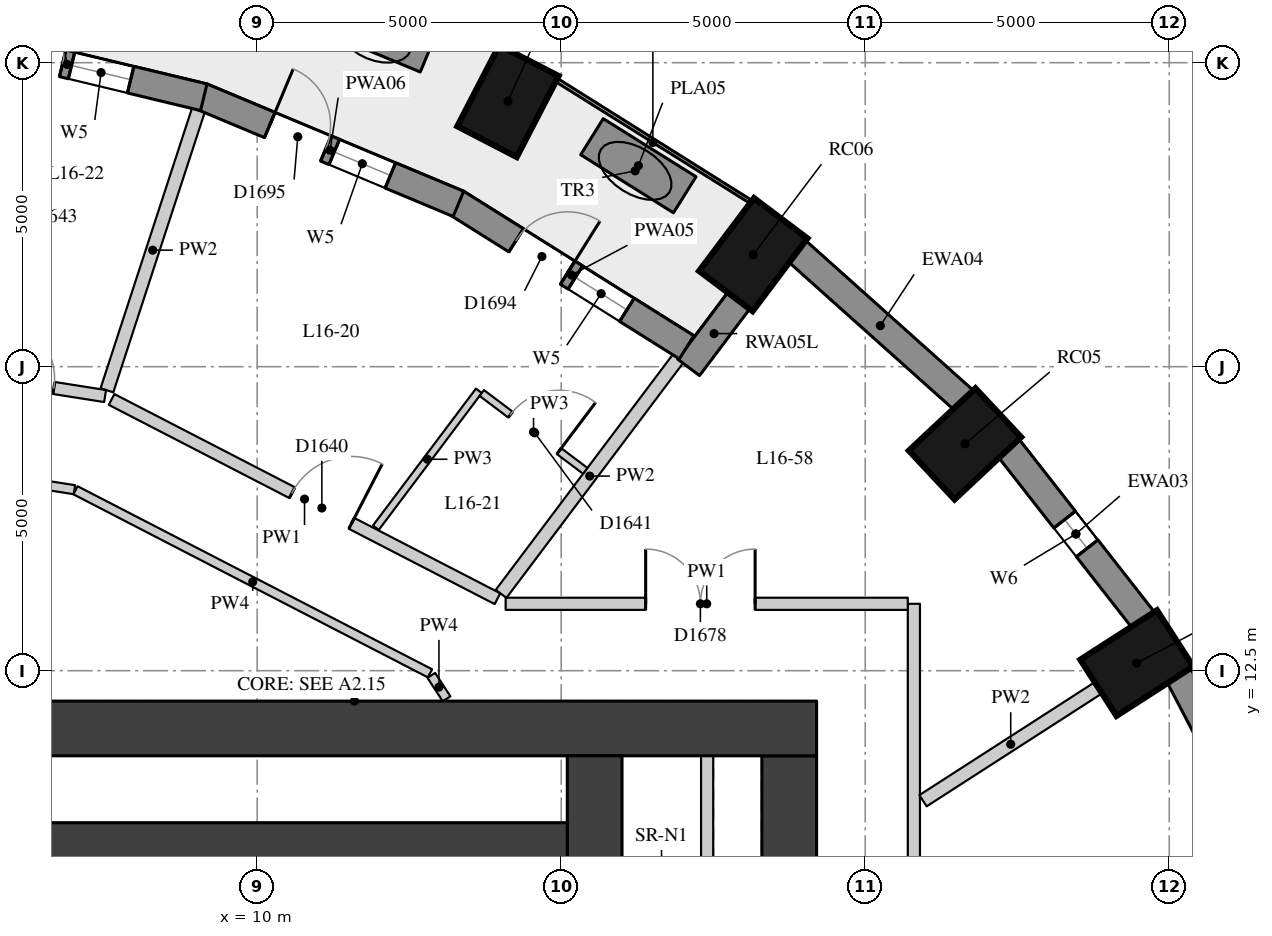
"""IFC4 building model, lengths in metres.
Left out: names, types, materials, properties, quantities, classifications, styles, units other than length and angle.
Written with IfcOpenShell. Run it as: python <this file> out.ifc"""

import sys

from ifc_helpers import new_model, si_unit, direction, frame, frame_2d, origin, origin_2d, place, context, subcontext, project, spatial, rectangle, extrude, element, fill, save


model = new_model("IFC4")
c1 = context("Model", 3, precision=1e-05, world=origin(), true_north=direction((0.0, 1.0)))
c2 = subcontext(c1, "Body", "Model", "MODEL_VIEW")
j1 = project(units=[si_unit("LENGTHUNIT", "METRE"), si_unit("PLANEANGLEUNIT", "RADIAN")], contexts=[c1])
p1 = place(None, origin())
s1 = spatial("IfcSite", under=j1, at=p1, CompositionType="ELEMENT")
p2 = place(p1, origin())
s2 = spatial("IfcBuilding", under=s1, at=p2, CompositionType="ELEMENT")
p3 = place(p2, frame((0.0, 0.0, 61.3)))
s3 = spatial("IfcBuildingStorey", under=s2, at=p3, CompositionType="ELEMENT", Elevation=61.3)
for number, where, z_axis, x_axis in (
    (1, (24.465, 12.625, 0.0), (0.0, 0.0, 1.0), (0.841, 0.541, 0.0)),
    (2, (21.641, 16.23, 0.0), (0.0, 0.0, 1.0), (0.73, 0.683, 0.0)),
    (3, (18.159, 19.343, 0.0), (0.0, 0.0, 1.0), (0.601, 0.799, 0.0)),
    (4, (14.125, 21.867, 0.0), (0.0, 0.0, 1.0), (0.46, 0.888, 0.0)),
):
    element("IfcColumn", number, at=place(p3, frame(where, z_axis=z_axis, x_axis=x_axis)), inside=s3, PredefinedType="COLUMN", context=c2, shape_type="SweptSolid", body=[
        extrude(rectangle(XDim=1.5, YDim=1.1, at=origin_2d()), origin(), (0.0, 0.0, 1.0), 3.3),
    ])
p4 = place(p3, frame((26.786, 9.305, 0.0), z_axis=(0.0, 0.0, 1.0), x_axis=(-0.462492775226, 0.886623050041, 0.0)))
e5 = element("IfcWall", 5, at=p4, inside=s3, PredefinedType="SOLIDWALL", context=c2, shape_type="SweptSolid", body=[
    extrude(rectangle(XDim=3.532, YDim=0.45, at=frame_2d((1.766, 0.0))), origin(), (0.0, 0.0, 1.0), 3.02),
])
p5 = place(p3, frame((24.578, 13.328, 0.0), z_axis=(0.0, 0.0, 1.0), x_axis=(-0.616661975264, 0.787228053529, 0.0)))
e6 = element("IfcWall", 6, at=p5, inside=s3, PredefinedType="SOLIDWALL", context=c2, shape_type="SweptSolid", body=[
    extrude(rectangle(XDim=3.61, YDim=0.45, at=frame_2d((1.805, 0.0))), origin(), (0.0, 0.0, 1.0), 3.02),
])
p6 = place(p5, frame((1.505, 0.0, 0.4)))
e7 = element("IfcOpeningElement", 7, at=p6, cuts=e6, PredefinedType="OPENING", context=c2, shape_type="SweptSolid", body=[
    extrude(rectangle(XDim=0.6, YDim=1.75, at=frame_2d((0.3, 0.875))), frame((0.0, 0.235, 0.0), z_axis=(0.0, -1.0, 0.0), x_axis=(1.0, 0.0, 0.0)), (0.0, 0.0, 1.0), 0.47),
])
p7 = place(p3, frame((21.627, 16.943, 0.0), z_axis=(0.0, 0.0, 1.0), x_axis=(-0.745526233716, 0.66647628228, 0.0)))
e8 = element("IfcWall", 8, at=p7, inside=s3, PredefinedType="SOLIDWALL", context=c2, shape_type="SweptSolid", body=[
    extrude(rectangle(XDim=3.697, YDim=0.45, at=frame_2d((1.848, 0.0))), origin(), (0.0, 0.0, 1.0), 3.02),
])
p8 = place(p3, frame((17.932, 18.6, 0.0), z_axis=(0.0, 0.0, 1.0), x_axis=(-0.601262851241, -0.799051302306, 0.0)))
e9 = element("IfcWall", 9, at=p8, inside=s3, PredefinedType="SOLIDWALL", context=c2, shape_type="SweptSolid", body=[
    extrude(rectangle(XDim=1.391, YDim=0.45, at=frame_2d((0.696, 0.0))), origin(), (0.0, 0.0, 1.0), 3.02),
])
p9 = place(p3, frame((17.062, 17.819, 0.0), z_axis=(0.0, 0.0, 1.0), x_axis=(-0.846990101364, 0.531608660757, 0.0)))
e10 = element("IfcWall", 10, at=p9, inside=s3, PredefinedType="SOLIDWALL", context=c2, shape_type="SweptSolid", body=[
    extrude(rectangle(XDim=4.469, YDim=0.45, at=frame_2d((2.234, 0.0))), origin(), (0.0, 0.0, 1.0), 3.02),
])
p10 = place(p9, frame((1.159, 0.0, 0.4)))
e11 = element("IfcOpeningElement", 11, at=p10, cuts=e10, PredefinedType="OPENING", context=c2, shape_type="SweptSolid", body=[
    extrude(rectangle(XDim=1.0, YDim=1.75, at=frame_2d((0.5, 0.875))), frame((0.0, 0.235, 0.0), z_axis=(0.0, -1.0, 0.0), x_axis=(1.0, 0.0, 0.0)), (0.0, 0.0, 1.0), 0.47),
])
p11 = place(p9, frame((2.31, 0.0, 0.0)))
e12 = element("IfcOpeningElement", 12, at=p11, cuts=e10, PredefinedType="OPENING", context=c2, shape_type="SweptSolid", body=[
    extrude(rectangle(XDim=1.0, YDim=2.15, at=frame_2d((0.5, 1.075))), frame((0.0, 0.235, 0.0), z_axis=(0.0, -1.0, 0.0), x_axis=(1.0, 0.0, 0.0)), (0.0, 0.0, 1.0), 0.47),
])
p12 = place(p3, frame((13.31, 20.178, 0.0), z_axis=(0.0, 0.0, 1.0), x_axis=(-0.922634412489, 0.385675693935, 0.0)))
e13 = element("IfcWall", 13, at=p12, inside=s3, PredefinedType="SOLIDWALL", context=c2, shape_type="SweptSolid", body=[
    extrude(rectangle(XDim=4.577, YDim=0.45, at=frame_2d((2.288, 0.0))), origin(), (0.0, 0.0, 1.0), 3.02),
])
p13 = place(p12, frame((1.213, 0.0, 0.4)))
e14 = element("IfcOpeningElement", 14, at=p13, cuts=e13, PredefinedType="OPENING", context=c2, shape_type="SweptSolid", body=[
    extrude(rectangle(XDim=1.0, YDim=1.75, at=frame_2d((0.5, 0.875))), frame((0.0, 0.235, 0.0), z_axis=(0.0, -1.0, 0.0), x_axis=(1.0, 0.0, 0.0)), (0.0, 0.0, 1.0), 0.47),
])
p14 = place(p12, frame((2.363, 0.0, 0.0)))
e15 = element("IfcOpeningElement", 15, at=p14, cuts=e13, PredefinedType="OPENING", context=c2, shape_type="SweptSolid", body=[
    extrude(rectangle(XDim=1.0, YDim=2.15, at=frame_2d((0.5, 1.075))), frame((0.0, 0.235, 0.0), z_axis=(0.0, -1.0, 0.0), x_axis=(1.0, 0.0, 0.0)), (0.0, 0.0, 1.0), 0.47),
])
p15 = place(p3, frame((9.122, 21.932, 0.0), z_axis=(0.0, 0.0, 1.0), x_axis=(-0.972346547441, 0.233542697764, 0.0)))
e16 = element("IfcWall", 16, at=p15, inside=s3, PredefinedType="SOLIDWALL", context=c2, shape_type="SweptSolid", body=[
    extrude(rectangle(XDim=4.624, YDim=0.45, at=frame_2d((2.312, 0.0))), origin(), (0.0, 0.0, 1.0), 3.02),
])
p16 = place(p15, frame((1.237, 0.0, 0.4)))
e17 = element("IfcOpeningElement", 17, at=p16, cuts=e16, PredefinedType="OPENING", context=c2, shape_type="SweptSolid", body=[
    extrude(rectangle(XDim=1.0, YDim=1.75, at=frame_2d((0.5, 0.875))), frame((0.0, 0.235, 0.0), z_axis=(0.0, -1.0, 0.0), x_axis=(1.0, 0.0, 0.0)), (0.0, 0.0, 1.0), 0.47),
])
p17 = place(p15, frame((2.387, 0.0, 0.0)))
e18 = element("IfcOpeningElement", 18, at=p17, cuts=e16, PredefinedType="OPENING", context=c2, shape_type="SweptSolid", body=[
    extrude(rectangle(XDim=1.0, YDim=2.15, at=frame_2d((0.5, 1.075))), frame((0.0, 0.235, 0.0), z_axis=(0.0, -1.0, 0.0), x_axis=(1.0, 0.0, 0.0)), (0.0, 0.0, 1.0), 0.47),
])
p18 = place(p3, frame((17.032, 20.328, 0.0), z_axis=(0.0, 0.0, 1.0), x_axis=(-0.847609446823, 0.530620604252, 0.0)))
e19 = element("IfcWall", 19, at=p18, inside=s3, PredefinedType="USERDEFINED", context=c2, shape_type="SweptSolid", body=[
    extrude(rectangle(XDim=1.8, YDim=0.7, at=frame_2d((0.9, 0.0))), origin(), (0.0, 0.0, 1.0), 0.75),
])
p19 = place(p3, frame((12.817, 22.67, 0.0), z_axis=(0.0, 0.0, 1.0), x_axis=(-0.923000660042, 0.384798364811, 0.0)))
e20 = element("IfcWall", 20, at=p19, inside=s3, PredefinedType="USERDEFINED", context=c2, shape_type="SweptSolid", body=[
    extrude(rectangle(XDim=1.8, YDim=0.7, at=frame_2d((0.9, 0.0))), origin(), (0.0, 0.0, 1.0), 0.75),
])
p20 = place(p3, frame((18.75, -11.1, 0.0), z_axis=(0.0, 0.0, 1.0), x_axis=(0.0, 1.0, 0.0)))
e21 = element("IfcWall", 21, at=p20, inside=s3, PredefinedType="SHEAR", context=c2, shape_type="SweptSolid", body=[
    extrude(rectangle(XDim=22.2, YDim=0.9, at=frame_2d((11.1, 0.0))), origin(), (0.0, 0.0, 1.0), 3.02),
])
p21 = place(p20, frame((16.175, 0.0, 0.0)))
e22 = element("IfcOpeningElement", 22, at=p21, cuts=e21, PredefinedType="OPENING", context=c2, shape_type="SweptSolid", body=[
    extrude(rectangle(XDim=1.5, YDim=2.1, at=frame_2d((0.75, 1.05))), frame((0.0, 0.46, 0.0), z_axis=(0.0, -1.0, 0.0), x_axis=(1.0, 0.0, 0.0)), (0.0, 0.0, 1.0), 0.92),
])
p22 = place(p20, frame((5.025, 0.0, 0.0)))
e23 = element("IfcOpeningElement", 23, at=p22, cuts=e21, PredefinedType="OPENING", context=c2, shape_type="SweptSolid", body=[
    extrude(rectangle(XDim=1.5, YDim=2.1, at=frame_2d((0.75, 1.05))), frame((0.0, 0.46, 0.0), z_axis=(0.0, -1.0, 0.0), x_axis=(1.0, 0.0, 0.0)), (0.0, 0.0, 1.0), 0.92),
])
p23 = place(p3, frame((4.0, 11.55, 0.0), z_axis=(0.0, 0.0, 1.0), x_axis=(1.0, 0.0, 0.0)))
e24 = element("IfcWall", 24, at=p23, inside=s3, PredefinedType="SHEAR", context=c2, shape_type="SweptSolid", body=[
    extrude(rectangle(XDim=15.2, YDim=0.9, at=frame_2d((7.6, 0.0))), origin(), (0.0, 0.0, 1.0), 3.02),
])
p24 = place(p3, frame((15.55, -11.1, 0.0), z_axis=(0.0, 0.0, 1.0), x_axis=(0.0, 1.0, 0.0)))
e25 = element("IfcWall", 25, at=p24, inside=s3, PredefinedType="SHEAR", context=c2, shape_type="SweptSolid", body=[
    extrude(rectangle(XDim=22.2, YDim=0.9, at=frame_2d((11.1, 0.0))), origin(), (0.0, 0.0, 1.0), 3.02),
])
p25 = place(p24, frame((15.6, 0.0, 0.0)))
e26 = element("IfcOpeningElement", 26, at=p25, cuts=e25, PredefinedType="OPENING", context=c2, shape_type="SweptSolid", body=[
    extrude(rectangle(XDim=1.0, YDim=2.1, at=frame_2d((0.5, 1.05))), frame((0.0, 0.46, 0.0), z_axis=(0.0, -1.0, 0.0), x_axis=(1.0, 0.0, 0.0)), (0.0, 0.0, 1.0), 0.92),
])
p26 = place(p24, frame((5.6, 0.0, 0.0)))
e27 = element("IfcOpeningElement", 27, at=p26, cuts=e25, PredefinedType="OPENING", context=c2, shape_type="SweptSolid", body=[
    extrude(rectangle(XDim=1.0, YDim=2.1, at=frame_2d((0.5, 1.05))), frame((0.0, 0.46, 0.0), z_axis=(0.0, -1.0, 0.0), x_axis=(1.0, 0.0, 0.0)), (0.0, 0.0, 1.0), 0.92),
])
p27 = place(p3, frame((4.9, 9.55, 0.0), z_axis=(0.0, 0.0, 1.0), x_axis=(1.0, 0.0, 0.0)))
e28 = element("IfcWall", 28, at=p27, inside=s3, PredefinedType="SHEAR", context=c2, shape_type="SweptSolid", body=[
    extrude(rectangle(XDim=10.2, YDim=0.9, at=frame_2d((5.1, 0.0))), origin(), (0.0, 0.0, 1.0), 3.02),
])
p28 = place(p3, frame((17.4, 7.4, 0.0), z_axis=(0.0, 0.0, 1.0), x_axis=(0.0, 1.0, 0.0)))
e29 = element("IfcWall", 29, at=p28, inside=s3, PredefinedType="PARTITIONING", context=c2, shape_type="SweptSolid", body=[
    extrude(rectangle(XDim=3.7, YDim=0.2, at=frame_2d((1.85, 0.0))), origin(), (0.0, 0.0, 1.0), 3.02),
])
p29 = place(p3, frame((20.8, 13.6, 0.0), z_axis=(0.0, 0.0, 1.0), x_axis=(0.0, -1.0, 0.0)))
e30 = element("IfcWall", 30, at=p29, inside=s3, PredefinedType="PARTITIONING", context=c2, shape_type="SweptSolid", body=[
    extrude(rectangle(XDim=10.428, YDim=0.2, at=frame_2d((5.214, 0.0))), origin(), (0.0, 0.0, 1.0), 3.02),
])
p30 = place(p29, frame((5.976, 0.0, 0.0)))
e31 = element("IfcOpeningElement", 31, at=p30, cuts=e30, PredefinedType="OPENING", context=c2, shape_type="SweptSolid", body=[
    extrude(rectangle(XDim=1.8, YDim=2.1, at=frame_2d((0.9, 1.05))), frame((0.0, 0.11, 0.0), z_axis=(0.0, -1.0, 0.0), x_axis=(1.0, 0.0, 0.0)), (0.0, 0.0, 1.0), 0.22),
])
p31 = place(p3, frame((0.119, 18.181, 0.0), z_axis=(0.0, 0.0, 1.0), x_axis=(0.987788122462, -0.155803161464, 0.0)))
e32 = element("IfcWall", 32, at=p31, inside=s3, PredefinedType="PARTITIONING", context=c2, shape_type="SweptSolid", body=[
    extrude(rectangle(XDim=7.471, YDim=0.2, at=frame_2d((3.736, 0.0))), origin(), (0.0, 0.0, 1.0), 3.02),
])
p32 = place(p31, frame((5.619, 0.0, 0.0)))
e33 = element("IfcOpeningElement", 33, at=p32, cuts=e32, PredefinedType="OPENING", context=c2, shape_type="SweptSolid", body=[
    extrude(rectangle(XDim=1.0, YDim=2.1, at=frame_2d((0.5, 1.05))), frame((0.0, 0.11, 0.0), z_axis=(0.0, -1.0, 0.0), x_axis=(1.0, 0.0, 0.0)), (0.0, 0.0, 1.0), 0.22),
])
p33 = place(p31, frame((0.732, 0.0, 0.0)))
e34 = element("IfcOpeningElement", 34, at=p33, cuts=e32, PredefinedType="OPENING", context=c2, shape_type="SweptSolid", body=[
    extrude(rectangle(XDim=1.0, YDim=2.1, at=frame_2d((0.5, 1.05))), frame((0.0, 0.11, 0.0), z_axis=(0.0, -1.0, 0.0), x_axis=(1.0, 0.0, 0.0)), (0.0, 0.0, 1.0), 0.22),
])
p34 = place(p3, frame((7.606, 16.961, 0.0), z_axis=(0.0, 0.0, 1.0), x_axis=(0.888519518851, -0.45883882205, 0.0)))
e35 = element("IfcWall", 35, at=p34, inside=s3, PredefinedType="PARTITIONING", context=c2, shape_type="SweptSolid", body=[
    extrude(rectangle(XDim=7.142, YDim=0.2, at=frame_2d((3.571, 0.0))), origin(), (0.0, 0.0, 1.0), 3.02),
])
p35 = place(p34, frame((3.342, 0.0, 0.0)))
e36 = element("IfcOpeningElement", 36, at=p35, cuts=e35, PredefinedType="OPENING", context=c2, shape_type="SweptSolid", body=[
    extrude(rectangle(XDim=1.1, YDim=2.1, at=frame_2d((0.55, 1.05))), frame((0.0, 0.11, 0.0), z_axis=(0.0, -1.0, 0.0), x_axis=(1.0, 0.0, 0.0)), (0.0, 0.0, 1.0), 0.22),
])
p36 = place(p3, frame((14.086, 13.6, 0.0), z_axis=(0.0, 0.0, 1.0), x_axis=(1.0, 0.0, 0.0)))
e37 = element("IfcWall", 37, at=p36, inside=s3, PredefinedType="PARTITIONING", context=c2, shape_type="SweptSolid", body=[
    extrude(rectangle(XDim=6.614, YDim=0.2, at=frame_2d((3.307, 0.0))), origin(), (0.0, 0.0, 1.0), 3.02),
])
p37 = place(p36, frame((2.303, 0.0, 0.0)))
e38 = element("IfcOpeningElement", 38, at=p37, cuts=e37, PredefinedType="OPENING", context=c2, shape_type="SweptSolid", body=[
    extrude(rectangle(XDim=1.8, YDim=2.1, at=frame_2d((0.9, 1.05))), frame((0.0, 0.11, 0.0), z_axis=(0.0, -1.0, 0.0), x_axis=(1.0, 0.0, 0.0)), (0.0, 0.0, 1.0), 0.22),
])
p38 = place(p3, frame((0.083, 16.567, 0.0), z_axis=(0.0, 0.0, 1.0), x_axis=(0.987781067139, -0.15584788546, 0.0)))
e39 = element("IfcWall", 39, at=p38, inside=s3, PredefinedType="PARTITIONING", context=c2, shape_type="SweptSolid", body=[
    extrude(rectangle(XDim=6.996, YDim=0.15, at=frame_2d((3.498, 0.0))), origin(), (0.0, 0.0, 1.0), 3.02),
])
p39 = place(p3, frame((7.012, 15.467, 0.0), z_axis=(0.0, 0.0, 1.0), x_axis=(0.888509096081, -0.458859004685, 0.0)))
e40 = element("IfcWall", 40, at=p39, inside=s3, PredefinedType="PARTITIONING", context=c2, shape_type="SweptSolid", body=[
    extrude(rectangle(XDim=6.561, YDim=0.15, at=frame_2d((3.281, 0.0))), origin(), (0.0, 0.0, 1.0), 3.02),
])
p40 = place(p3, frame((12.864, 12.423, 0.0), z_axis=(0.0, 0.0, 1.0), x_axis=(0.545733799108, -0.837958603101, 0.0)))
e41 = element("IfcWall", 41, at=p40, inside=s3, PredefinedType="PARTITIONING", context=c2, shape_type="SweptSolid", body=[
    extrude(rectangle(XDim=0.46, YDim=0.15, at=frame_2d((0.23, 0.0))), origin(), (0.0, 0.0, 1.0), 3.02),
])
p41 = place(p3, frame((23.835, 12.219, 0.0), z_axis=(0.0, 0.0, 1.0), x_axis=(-0.840694872373, -0.541509124176, 0.0)))
e42 = element("IfcWall", 42, at=p41, inside=s3, PredefinedType="PARTITIONING", context=c2, shape_type="SweptSolid", body=[
    extrude(rectangle(XDim=3.43, YDim=0.22, at=frame_2d((1.715, 0.0))), origin(), (0.0, 0.0, 1.0), 3.02),
])
p42 = place(p3, frame((16.927, 17.638, 0.0), z_axis=(0.0, 0.0, 1.0), x_axis=(-0.601159395391, -0.799129139334, 0.0)))
e43 = element("IfcWall", 43, at=p42, inside=s3, PredefinedType="PARTITIONING", context=c2, shape_type="SweptSolid", body=[
    extrude(rectangle(XDim=4.849, YDim=0.22, at=frame_2d((2.425, 0.0))), origin(), (0.0, 0.0, 1.0), 3.02),
])
p43 = place(p3, frame((9.034, 21.721, 0.0), z_axis=(0.0, 0.0, 1.0), x_axis=(-0.310330277344, -0.95062880188, 0.0)))
e44 = element("IfcWall", 44, at=p43, inside=s3, PredefinedType="PARTITIONING", context=c2, shape_type="SweptSolid", body=[
    extrude(rectangle(XDim=4.848, YDim=0.22, at=frame_2d((2.424, 0.0))), origin(), (0.0, 0.0, 1.0), 3.02),
])
p44 = place(p3, frame((11.952, 14.852, 0.0), z_axis=(0.0, 0.0, 1.0), x_axis=(0.60115003842, 0.7991361782, 0.0)))
e45 = element("IfcWall", 45, at=p44, inside=s3, PredefinedType="PARTITIONING", context=c2, shape_type="SweptSolid", body=[
    extrude(rectangle(XDim=2.818, YDim=0.12, at=frame_2d((1.409, 0.0))), origin(), (0.0, 0.0, 1.0), 3.02),
])
p45 = place(p3, frame((13.694, 17.067, 0.0), z_axis=(0.0, 0.0, 1.0), x_axis=(0.799118870394, -0.601173045786, 0.0)))
e46 = element("IfcWall", 46, at=p45, inside=s3, PredefinedType="PARTITIONING", context=c2, shape_type="SweptSolid", body=[
    extrude(rectangle(XDim=2.13, YDim=0.12, at=frame_2d((1.065, 0.0))), origin(), (0.0, 0.0, 1.0), 3.02),
])
p46 = place(p45, frame((0.59, 0.0, 0.0)))
e47 = element("IfcOpeningElement", 47, at=p46, cuts=e46, PredefinedType="OPENING", context=c2, shape_type="SweptSolid", body=[
    extrude(rectangle(XDim=1.0, YDim=2.1, at=frame_2d((0.5, 1.05))), frame((0.0, 0.07, 0.0), z_axis=(0.0, -1.0, 0.0), x_axis=(1.0, 0.0, 0.0)), (0.0, 0.0, 1.0), 0.14),
])
p47 = place(p6, origin())
e48 = element("IfcWindow", 48, at=p47, inside=s3, PartitioningType="SINGLE_PANEL", PredefinedType="WINDOW", context=c2, shape_type="SweptSolid", body=[
    extrude(rectangle(XDim=0.6, YDim=1.75, at=frame_2d((0.3, 0.875))), frame((0.0, 0.035, 0.0), z_axis=(0.0, -1.0, 0.0), x_axis=(1.0, 0.0, 0.0)), (0.0, 0.0, 1.0), 0.06),
])
fill(e7, e48)
p48 = place(p10, origin())
e49 = element("IfcWindow", 49, at=p48, inside=s3, PartitioningType="SINGLE_PANEL", PredefinedType="WINDOW", context=c2, shape_type="SweptSolid", body=[
    extrude(rectangle(XDim=1.0, YDim=1.75, at=frame_2d((0.5, 0.875))), frame((0.0, 0.035, 0.0), z_axis=(0.0, -1.0, 0.0), x_axis=(1.0, 0.0, 0.0)), (0.0, 0.0, 1.0), 0.06),
])
fill(e11, e49)
p49 = place(p11, frame((1.0, 0.0, 0.0), z_axis=(0.0, 0.0, 1.0), x_axis=(-1.0, 0.0, 0.0)))
e50 = element("IfcDoor", 50, at=p49, inside=s3, OperationType="SINGLE_SWING_RIGHT", PredefinedType="DOOR", context=c2, shape_type="SweptSolid", body=[
    extrude(rectangle(XDim=1.0, YDim=2.15, at=frame_2d((0.5, 1.075))), frame((0.0, 0.075, 0.0), z_axis=(0.0, -1.0, 0.0), x_axis=(1.0, 0.0, 0.0)), (0.0, 0.0, 1.0), 0.05),
])
fill(e12, e50)
p50 = place(p13, origin())
e51 = element("IfcWindow", 51, at=p50, inside=s3, PartitioningType="SINGLE_PANEL", PredefinedType="WINDOW", context=c2, shape_type="SweptSolid", body=[
    extrude(rectangle(XDim=1.0, YDim=1.75, at=frame_2d((0.5, 0.875))), frame((0.0, 0.035, 0.0), z_axis=(0.0, -1.0, 0.0), x_axis=(1.0, 0.0, 0.0)), (0.0, 0.0, 1.0), 0.06),
])
fill(e14, e51)
p51 = place(p14, frame((1.0, 0.0, 0.0), z_axis=(0.0, 0.0, 1.0), x_axis=(-1.0, 0.0, 0.0)))
e52 = element("IfcDoor", 52, at=p51, inside=s3, OperationType="SINGLE_SWING_LEFT", PredefinedType="DOOR", context=c2, shape_type="SweptSolid", body=[
    extrude(rectangle(XDim=1.0, YDim=2.15, at=frame_2d((0.5, 1.075))), frame((0.0, 0.075, 0.0), z_axis=(0.0, -1.0, 0.0), x_axis=(1.0, 0.0, 0.0)), (0.0, 0.0, 1.0), 0.05),
])
fill(e15, e52)
p52 = place(p16, origin())
e53 = element("IfcWindow", 53, at=p52, inside=s3, PartitioningType="SINGLE_PANEL", PredefinedType="WINDOW", context=c2, shape_type="SweptSolid", body=[
    extrude(rectangle(XDim=1.0, YDim=1.75, at=frame_2d((0.5, 0.875))), frame((0.0, 0.035, 0.0), z_axis=(0.0, -1.0, 0.0), x_axis=(1.0, 0.0, 0.0)), (0.0, 0.0, 1.0), 0.06),
])
fill(e17, e53)
p53 = place(p17, frame((1.0, 0.0, 0.0), z_axis=(0.0, 0.0, 1.0), x_axis=(-1.0, 0.0, 0.0)))
e54 = element("IfcDoor", 54, at=p53, inside=s3, OperationType="SINGLE_SWING_LEFT", PredefinedType="DOOR", context=c2, shape_type="SweptSolid", body=[
    extrude(rectangle(XDim=1.0, YDim=2.15, at=frame_2d((0.5, 1.075))), frame((0.0, 0.075, 0.0), z_axis=(0.0, -1.0, 0.0), x_axis=(1.0, 0.0, 0.0)), (0.0, 0.0, 1.0), 0.05),
])
fill(e18, e54)
p54 = place(p35, origin())
e55 = element("IfcDoor", 55, at=p54, inside=s3, OperationType="SINGLE_SWING_RIGHT", PredefinedType="DOOR", context=c2, shape_type="SweptSolid", body=[
    extrude(rectangle(XDim=1.1, YDim=2.1, at=frame_2d((0.55, 1.05))), frame((0.0, 0.025, 0.0), z_axis=(0.0, -1.0, 0.0), x_axis=(1.0, 0.0, 0.0)), (0.0, 0.0, 1.0), 0.05),
])
fill(e36, e55)
p55 = place(p46, origin())
e56 = element("IfcDoor", 56, at=p55, inside=s3, OperationType="SINGLE_SWING_RIGHT", PredefinedType="DOOR", context=c2, shape_type="SweptSolid", body=[
    extrude(rectangle(XDim=1.0, YDim=2.1, at=frame_2d((0.5, 1.05))), frame((0.0, 0.025, 0.0), z_axis=(0.0, -1.0, 0.0), x_axis=(1.0, 0.0, 0.0)), (0.0, 0.0, 1.0), 0.05),
])
fill(e47, e56)
p56 = place(p32, origin())
e57 = element("IfcDoor", 57, at=p56, inside=s3, OperationType="SINGLE_SWING_LEFT", PredefinedType="DOOR", context=c2, shape_type="SweptSolid", body=[
    extrude(rectangle(XDim=1.0, YDim=2.1, at=frame_2d((0.5, 1.05))), frame((0.0, 0.025, 0.0), z_axis=(0.0, -1.0, 0.0), x_axis=(1.0, 0.0, 0.0)), (0.0, 0.0, 1.0), 0.05),
])
fill(e33, e57)
p57 = place(p37, origin())
e58 = element("IfcDoor", 58, at=p57, inside=s3, OperationType="DOUBLE_DOOR_SINGLE_SWING", PredefinedType="DOOR", context=c2, shape_type="SweptSolid", body=[
    extrude(rectangle(XDim=1.8, YDim=2.1, at=frame_2d((0.9, 1.05))), frame((0.0, 0.025, 0.0), z_axis=(0.0, -1.0, 0.0), x_axis=(1.0, 0.0, 0.0)), (0.0, 0.0, 1.0), 0.05),
])
fill(e38, e58)
save(model, sys.argv[1])
